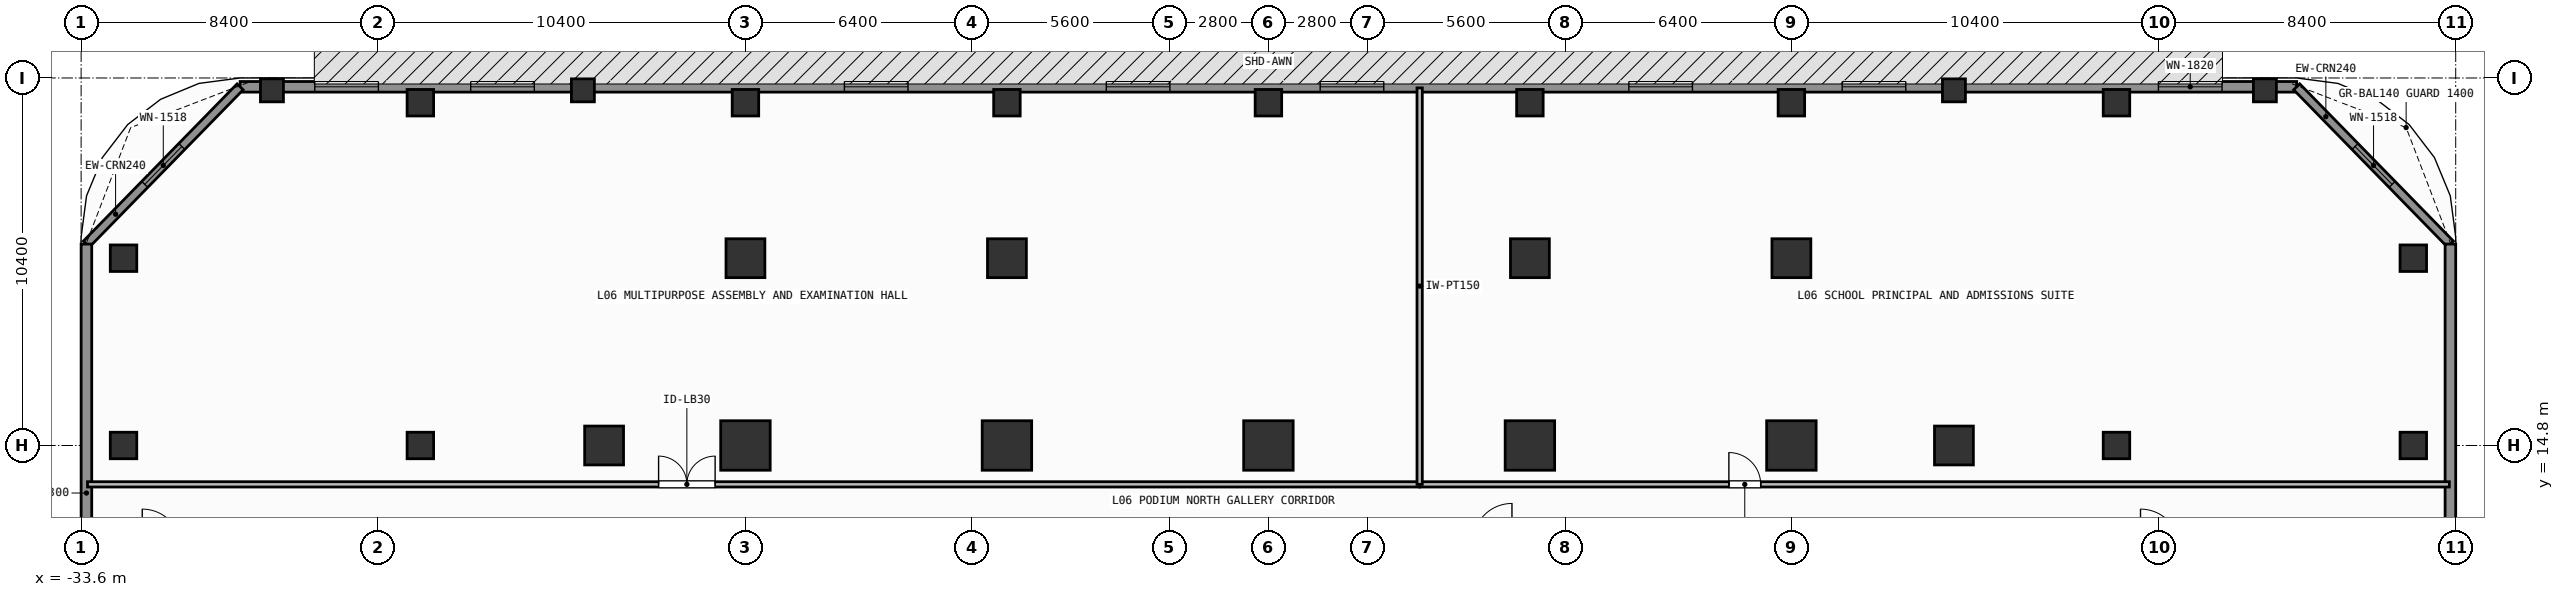
"""IFC4 building model, lengths in metres.
Left out: names, types, materials, properties, quantities, classifications, styles, units other than length and angle.
Written with IfcOpenShell. Run it as: python <this file> out.ifc"""

import sys

from ifc_helpers import new_model, si_unit, direction, frame, frame_2d, origin, origin_2d, place, context, subcontext, project, spatial, rectangle, extrude, element, fill, save


model = new_model("IFC4")
c1 = context("Model", 3, precision=1e-05, world=origin(), true_north=direction((0.0, 1.0)))
c2 = subcontext(c1, "Body", "Model", "MODEL_VIEW")
j1 = project(units=[si_unit("LENGTHUNIT", "METRE"), si_unit("PLANEANGLEUNIT", "RADIAN")], contexts=[c1])
p1 = place(None, origin())
s1 = spatial("IfcSite", under=j1, at=p1, CompositionType="ELEMENT")
p2 = place(p1, origin())
s2 = spatial("IfcBuilding", under=s1, at=p2, CompositionType="ELEMENT")
p3 = place(p2, frame((0.0, 0.0, 21.6)))
s3 = spatial("IfcBuildingStorey", under=s2, at=p3, CompositionType="ELEMENT", Elevation=21.6)
for number, where, z_axis, x_axis in (
    (1, (-14.8, 14.8, 0.0), (0.0, 0.0, 1.0), (1.0, 0.0, 0.0)),
    (2, (-7.4, 14.8, 0.0), (0.0, 0.0, 1.0), (1.0, 0.0, 0.0)),
    (3, (0.0, 14.8, 0.0), (0.0, 0.0, 1.0), (1.0, 0.0, 0.0)),
    (4, (7.4, 14.8, 0.0), (0.0, 0.0, 1.0), (1.0, 0.0, 0.0)),
    (5, (14.8, 14.8, 0.0), (0.0, 0.0, 1.0), (1.0, 0.0, 0.0)),
):
    element("IfcColumn", number, at=place(p3, frame(where, z_axis=z_axis, x_axis=x_axis)), inside=s3, PredefinedType="COLUMN", context=c2, shape_type="SweptSolid", body=[
        extrude(rectangle(XDim=1.4, YDim=1.4, at=origin_2d()), origin(), (0.0, 0.0, 1.0), 4.8),
    ])
for number, where, z_axis, x_axis in (
    (6, (-18.8, 14.8, 0.0), (0.0, 0.0, 1.0), (1.0, 0.0, 0.0)),
    (7, (19.4, 14.8, 0.0), (0.0, 0.0, 1.0), (1.0, 0.0, 0.0)),
    (8, (-14.8, 20.1, 0.0), (0.0, 0.0, 1.0), (1.0, 0.0, 0.0)),
    (9, (-7.4, 20.1, 0.0), (0.0, 0.0, 1.0), (1.0, 0.0, 0.0)),
    (10, (7.4, 20.1, 0.0), (0.0, 0.0, 1.0), (1.0, 0.0, 0.0)),
    (11, (14.8, 20.1, 0.0), (0.0, 0.0, 1.0), (1.0, 0.0, 0.0)),
):
    element("IfcColumn", number, at=place(p3, frame(where, z_axis=z_axis, x_axis=x_axis)), inside=s3, PredefinedType="COLUMN", context=c2, shape_type="SweptSolid", body=[
        extrude(rectangle(XDim=1.1, YDim=1.1, at=origin_2d()), origin(), (0.0, 0.0, 1.0), 4.8),
    ])
for number, where, z_axis, x_axis in (
    (12, (-32.4, 14.8, 0.0), (0.0, 0.0, 1.0), (1.0, 0.0, 0.0)),
    (13, (-24.0, 14.8, 0.0), (0.0, 0.0, 1.0), (1.0, 0.0, 0.0)),
    (14, (-24.0, 24.5, 0.0), (0.0, 0.0, 1.0), (1.0, 0.0, 0.0)),
    (15, (-14.8, 24.5, 0.0), (0.0, 0.0, 1.0), (1.0, 0.0, 0.0)),
    (16, (-7.4, 24.5, 0.0), (0.0, 0.0, 1.0), (1.0, 0.0, 0.0)),
    (17, (0.0, 24.5, 0.0), (0.0, 0.0, 1.0), (1.0, 0.0, 0.0)),
    (18, (7.4, 24.5, 0.0), (0.0, 0.0, 1.0), (1.0, 0.0, 0.0)),
    (19, (14.8, 24.5, 0.0), (0.0, 0.0, 1.0), (1.0, 0.0, 0.0)),
    (20, (24.0, 14.8, 0.0), (0.0, 0.0, 1.0), (1.0, 0.0, 0.0)),
    (21, (24.0, 24.5, 0.0), (0.0, 0.0, 1.0), (1.0, 0.0, 0.0)),
    (22, (32.4, 14.8, 0.0), (0.0, 0.0, 1.0), (1.0, 0.0, 0.0)),
    (23, (-32.4, 20.1, 0.0), (0.0, 0.0, 1.0), (1.0, 0.0, 0.0)),
    (24, (32.4, 20.1, 0.0), (0.0, 0.0, 1.0), (1.0, 0.0, 0.0)),
):
    element("IfcColumn", number, at=place(p3, frame(where, z_axis=z_axis, x_axis=x_axis)), inside=s3, PredefinedType="COLUMN", context=c2, shape_type="SweptSolid", body=[
        extrude(rectangle(XDim=0.75, YDim=0.75, at=origin_2d()), origin(), (0.0, 0.0, 1.0), 4.8),
    ])
for number, where, z_axis, x_axis in (
    (25, (-28.2, 24.85, 0.0), (0.0, 0.0, 1.0), (1.0, 0.0, 0.0)),
    (26, (-19.4, 24.85, 0.0), (0.0, 0.0, 1.0), (1.0, 0.0, 0.0)),
    (27, (19.4, 24.85, 0.0), (0.0, 0.0, 1.0), (1.0, 0.0, 0.0)),
    (28, (28.2, 24.85, 0.0), (0.0, 0.0, 1.0), (1.0, 0.0, 0.0)),
):
    element("IfcColumn", number, at=place(p3, frame(where, z_axis=z_axis, x_axis=x_axis)), inside=s3, PredefinedType="PILASTER", context=c2, shape_type="SweptSolid", body=[
        extrude(rectangle(XDim=0.65, YDim=0.65, at=origin_2d()), origin(), (0.0, 0.0, 1.0), 4.8),
    ])
p4 = place(p3, frame((-29.1, 24.95, 0.0), z_axis=(0.0, 0.0, 1.0), x_axis=(1.0, 0.0, 0.0)))
e29 = element("IfcWall", 29, at=p4, inside=s3, PredefinedType="SOLIDWALL", context=c2, shape_type="SweptSolid", body=[
    extrude(rectangle(XDim=58.2, YDim=0.3, at=frame_2d((29.1, 0.0))), origin(), (0.0, 0.0, 1.0), 4.48),
])
p5 = place(p4, frame((2.113, 0.0, 0.85)))
e30 = element("IfcOpeningElement", 30, at=p5, cuts=e29, PredefinedType="OPENING", context=c2, shape_type="SweptSolid", body=[
    extrude(rectangle(XDim=1.8, YDim=2.0, at=frame_2d((0.9, 1.0))), frame((0.0, 0.16, 0.0), z_axis=(0.0, -1.0, 0.0), x_axis=(1.0, 0.0, 0.0)), (0.0, 0.0, 1.0), 0.32),
])
p6 = place(p4, frame((6.525, 0.0, 0.85)))
e31 = element("IfcOpeningElement", 31, at=p6, cuts=e29, PredefinedType="OPENING", context=c2, shape_type="SweptSolid", body=[
    extrude(rectangle(XDim=1.8, YDim=2.0, at=frame_2d((0.9, 1.0))), frame((0.0, 0.16, 0.0), z_axis=(0.0, -1.0, 0.0), x_axis=(1.0, 0.0, 0.0)), (0.0, 0.0, 1.0), 0.32),
])
p7 = place(p4, frame((17.1, 0.0, 0.85)))
e32 = element("IfcOpeningElement", 32, at=p7, cuts=e29, PredefinedType="OPENING", context=c2, shape_type="SweptSolid", body=[
    extrude(rectangle(XDim=1.8, YDim=2.0, at=frame_2d((0.9, 1.0))), frame((0.0, 0.16, 0.0), z_axis=(0.0, -1.0, 0.0), x_axis=(1.0, 0.0, 0.0)), (0.0, 0.0, 1.0), 0.32),
])
p8 = place(p4, frame((24.512, 0.0, 0.85)))
e33 = element("IfcOpeningElement", 33, at=p8, cuts=e29, PredefinedType="OPENING", context=c2, shape_type="SweptSolid", body=[
    extrude(rectangle(XDim=1.8, YDim=2.0, at=frame_2d((0.9, 1.0))), frame((0.0, 0.16, 0.0), z_axis=(0.0, -1.0, 0.0), x_axis=(1.0, 0.0, 0.0)), (0.0, 0.0, 1.0), 0.32),
])
p9 = place(p4, frame((30.565, 0.0, 0.85)))
e34 = element("IfcOpeningElement", 34, at=p9, cuts=e29, PredefinedType="OPENING", context=c2, shape_type="SweptSolid", body=[
    extrude(rectangle(XDim=1.8, YDim=2.0, at=frame_2d((0.9, 1.0))), frame((0.0, 0.16, 0.0), z_axis=(0.0, -1.0, 0.0), x_axis=(1.0, 0.0, 0.0)), (0.0, 0.0, 1.0), 0.32),
])
p10 = place(p4, frame((39.3, 0.0, 0.85)))
e35 = element("IfcOpeningElement", 35, at=p10, cuts=e29, PredefinedType="OPENING", context=c2, shape_type="SweptSolid", body=[
    extrude(rectangle(XDim=1.8, YDim=2.0, at=frame_2d((0.9, 1.0))), frame((0.0, 0.16, 0.0), z_axis=(0.0, -1.0, 0.0), x_axis=(1.0, 0.0, 0.0)), (0.0, 0.0, 1.0), 0.32),
])
p11 = place(p4, frame((45.337, 0.0, 0.85)))
e36 = element("IfcOpeningElement", 36, at=p11, cuts=e29, PredefinedType="OPENING", context=c2, shape_type="SweptSolid", body=[
    extrude(rectangle(XDim=1.8, YDim=2.0, at=frame_2d((0.9, 1.0))), frame((0.0, 0.16, 0.0), z_axis=(0.0, -1.0, 0.0), x_axis=(1.0, 0.0, 0.0)), (0.0, 0.0, 1.0), 0.32),
])
p12 = place(p4, frame((54.287, 0.0, 0.85)))
e37 = element("IfcOpeningElement", 37, at=p12, cuts=e29, PredefinedType="OPENING", context=c2, shape_type="SweptSolid", body=[
    extrude(rectangle(XDim=1.8, YDim=2.0, at=frame_2d((0.9, 1.0))), frame((0.0, 0.16, 0.0), z_axis=(0.0, -1.0, 0.0), x_axis=(1.0, 0.0, 0.0)), (0.0, 0.0, 1.0), 0.32),
])
p13 = place(p3, frame((-33.45, 20.5, 0.0), z_axis=(0.0, 0.0, 1.0), x_axis=(0.69901822973, 0.715103848756, 0.0)))
e38 = element("IfcWall", 38, at=p13, inside=s3, PredefinedType="SOLIDWALL", context=c2, shape_type="SweptSolid", body=[
    extrude(rectangle(XDim=6.223, YDim=0.24, at=frame_2d((3.111, 0.0))), origin(), (0.0, 0.0, 1.0), 4.48),
])
p14 = place(p13, frame((2.362, 0.0, 0.85)))
e39 = element("IfcOpeningElement", 39, at=p14, cuts=e38, PredefinedType="OPENING", context=c2, shape_type="SweptSolid", body=[
    extrude(rectangle(XDim=1.5, YDim=1.85, at=frame_2d((0.75, 0.925))), frame((0.0, 0.13, 0.0), z_axis=(0.0, -1.0, 0.0), x_axis=(1.0, 0.0, 0.0)), (0.0, 0.0, 1.0), 0.26),
])
p15 = place(p3, frame((29.1, 24.95, 0.0), z_axis=(0.0, 0.0, 1.0), x_axis=(0.69901822973, -0.715103848756, 0.0)))
e40 = element("IfcWall", 40, at=p15, inside=s3, PredefinedType="SOLIDWALL", context=c2, shape_type="SweptSolid", body=[
    extrude(rectangle(XDim=6.223, YDim=0.24, at=frame_2d((3.111, 0.0))), origin(), (0.0, 0.0, 1.0), 4.48),
])
p16 = place(p15, frame((2.362, 0.0, 0.85)))
e41 = element("IfcOpeningElement", 41, at=p16, cuts=e40, PredefinedType="OPENING", context=c2, shape_type="SweptSolid", body=[
    extrude(rectangle(XDim=1.5, YDim=1.85, at=frame_2d((0.75, 0.925))), frame((0.0, 0.13, 0.0), z_axis=(0.0, -1.0, 0.0), x_axis=(1.0, 0.0, 0.0)), (0.0, 0.0, 1.0), 0.26),
])
for number, where, z_axis, x_axis in (
    (42, (-33.45, 6.41, 0.0), (0.0, 0.0, 1.0), (0.0, 1.0, 0.0)),
    (43, (33.45, 6.41, 0.0), (0.0, 0.0, 1.0), (0.0, 1.0, 0.0)),
):
    element("IfcWall", number, at=place(p3, frame(where, z_axis=z_axis, x_axis=x_axis)), inside=s3, PredefinedType="SOLIDWALL", context=c2, shape_type="SweptSolid", body=[
        extrude(rectangle(XDim=14.09, YDim=0.3, at=frame_2d((7.045, 0.0))), origin(), (0.0, 0.0, 1.0), 4.48),
    ])
p17 = place(p3, frame((-33.42, 13.7, 0.0), z_axis=(0.0, 0.0, 1.0), x_axis=(1.0, 0.0, 0.0)))
e44 = element("IfcWall", 44, at=p17, inside=s3, PredefinedType="PARTITIONING", context=c2, shape_type="SweptSolid", body=[
    extrude(rectangle(XDim=37.7, YDim=0.15, at=frame_2d((18.85, 0.0))), origin(), (0.0, 0.0, 1.0), 4.48),
])
p18 = place(p17, frame((16.162, 0.0, 0.0)))
e45 = element("IfcOpeningElement", 45, at=p18, cuts=e44, PredefinedType="OPENING", context=c2, shape_type="SweptSolid", body=[
    extrude(rectangle(XDim=1.6, YDim=2.3, at=frame_2d((0.8, 1.15))), frame((0.0, 0.085, 0.0), z_axis=(0.0, -1.0, 0.0), x_axis=(1.0, 0.0, 0.0)), (0.0, 0.0, 1.0), 0.17),
])
p19 = place(p3, frame((4.28, 13.7, 0.0), z_axis=(0.0, 0.0, 1.0), x_axis=(1.0, 0.0, 0.0)))
e46 = element("IfcWall", 46, at=p19, inside=s3, PredefinedType="PARTITIONING", context=c2, shape_type="SweptSolid", body=[
    extrude(rectangle(XDim=29.14, YDim=0.15, at=frame_2d((14.57, 0.0))), origin(), (0.0, 0.0, 1.0), 4.48),
])
p20 = place(p19, frame((8.751, 0.0, 0.0)))
e47 = element("IfcOpeningElement", 47, at=p20, cuts=e46, PredefinedType="OPENING", context=c2, shape_type="SweptSolid", body=[
    extrude(rectangle(XDim=0.9, YDim=2.1, at=frame_2d((0.45, 1.05))), frame((0.0, 0.085, 0.0), z_axis=(0.0, -1.0, 0.0), x_axis=(1.0, 0.0, 0.0)), (0.0, 0.0, 1.0), 0.17),
])
p21 = place(p3, frame((4.28, 13.7, 0.0), z_axis=(0.0, 0.0, 1.0), x_axis=(0.0, 1.0, 0.0)))
e48 = element("IfcWall", 48, at=p21, inside=s3, PredefinedType="PARTITIONING", context=c2, shape_type="SweptSolid", body=[
    extrude(rectangle(XDim=11.22, YDim=0.15, at=frame_2d((5.61, 0.0))), origin(), (0.0, 0.0, 1.0), 4.48),
])
p22 = place(p14, origin())
e49 = element("IfcWindow", 49, at=p22, inside=s3, PartitioningType="SINGLE_PANEL", PredefinedType="WINDOW", context=c2, shape_type="SweptSolid", body=[
    extrude(rectangle(XDim=1.5, YDim=1.85, at=frame_2d((0.75, 0.925))), frame((0.0, 0.03, 0.0), z_axis=(0.0, -1.0, 0.0), x_axis=(1.0, 0.0, 0.0)), (0.0, 0.0, 1.0), 0.06),
])
fill(e39, e49)
p23 = place(p16, origin())
e50 = element("IfcWindow", 50, at=p23, inside=s3, PartitioningType="SINGLE_PANEL", PredefinedType="WINDOW", context=c2, shape_type="SweptSolid", body=[
    extrude(rectangle(XDim=1.5, YDim=1.85, at=frame_2d((0.75, 0.925))), frame((0.0, 0.03, 0.0), z_axis=(0.0, -1.0, 0.0), x_axis=(1.0, 0.0, 0.0)), (0.0, 0.0, 1.0), 0.06),
])
fill(e41, e50)
p24 = place(p5, origin())
e51 = element("IfcWindow", 51, at=p24, inside=s3, PartitioningType="SINGLE_PANEL", PredefinedType="WINDOW", context=c2, shape_type="SweptSolid", body=[
    extrude(rectangle(XDim=1.8, YDim=2.0, at=frame_2d((0.9, 1.0))), frame((0.0, 0.03, 0.0), z_axis=(0.0, -1.0, 0.0), x_axis=(1.0, 0.0, 0.0)), (0.0, 0.0, 1.0), 0.06),
])
fill(e30, e51)
p25 = place(p6, origin())
e52 = element("IfcWindow", 52, at=p25, inside=s3, PartitioningType="SINGLE_PANEL", PredefinedType="WINDOW", context=c2, shape_type="SweptSolid", body=[
    extrude(rectangle(XDim=1.8, YDim=2.0, at=frame_2d((0.9, 1.0))), frame((0.0, 0.03, 0.0), z_axis=(0.0, -1.0, 0.0), x_axis=(1.0, 0.0, 0.0)), (0.0, 0.0, 1.0), 0.06),
])
fill(e31, e52)
p26 = place(p7, origin())
e53 = element("IfcWindow", 53, at=p26, inside=s3, PartitioningType="SINGLE_PANEL", PredefinedType="WINDOW", context=c2, shape_type="SweptSolid", body=[
    extrude(rectangle(XDim=1.8, YDim=2.0, at=frame_2d((0.9, 1.0))), frame((0.0, 0.03, 0.0), z_axis=(0.0, -1.0, 0.0), x_axis=(1.0, 0.0, 0.0)), (0.0, 0.0, 1.0), 0.06),
])
fill(e32, e53)
p27 = place(p8, origin())
e54 = element("IfcWindow", 54, at=p27, inside=s3, PartitioningType="SINGLE_PANEL", PredefinedType="WINDOW", context=c2, shape_type="SweptSolid", body=[
    extrude(rectangle(XDim=1.8, YDim=2.0, at=frame_2d((0.9, 1.0))), frame((0.0, 0.03, 0.0), z_axis=(0.0, -1.0, 0.0), x_axis=(1.0, 0.0, 0.0)), (0.0, 0.0, 1.0), 0.06),
])
fill(e33, e54)
p28 = place(p9, origin())
e55 = element("IfcWindow", 55, at=p28, inside=s3, PartitioningType="SINGLE_PANEL", PredefinedType="WINDOW", context=c2, shape_type="SweptSolid", body=[
    extrude(rectangle(XDim=1.8, YDim=2.0, at=frame_2d((0.9, 1.0))), frame((0.0, 0.03, 0.0), z_axis=(0.0, -1.0, 0.0), x_axis=(1.0, 0.0, 0.0)), (0.0, 0.0, 1.0), 0.06),
])
fill(e34, e55)
p29 = place(p10, origin())
e56 = element("IfcWindow", 56, at=p29, inside=s3, PartitioningType="SINGLE_PANEL", PredefinedType="WINDOW", context=c2, shape_type="SweptSolid", body=[
    extrude(rectangle(XDim=1.8, YDim=2.0, at=frame_2d((0.9, 1.0))), frame((0.0, 0.03, 0.0), z_axis=(0.0, -1.0, 0.0), x_axis=(1.0, 0.0, 0.0)), (0.0, 0.0, 1.0), 0.06),
])
fill(e35, e56)
p30 = place(p11, origin())
e57 = element("IfcWindow", 57, at=p30, inside=s3, PartitioningType="SINGLE_PANEL", PredefinedType="WINDOW", context=c2, shape_type="SweptSolid", body=[
    extrude(rectangle(XDim=1.8, YDim=2.0, at=frame_2d((0.9, 1.0))), frame((0.0, 0.03, 0.0), z_axis=(0.0, -1.0, 0.0), x_axis=(1.0, 0.0, 0.0)), (0.0, 0.0, 1.0), 0.06),
])
fill(e36, e57)
p31 = place(p12, origin())
e58 = element("IfcWindow", 58, at=p31, inside=s3, PartitioningType="SINGLE_PANEL", PredefinedType="WINDOW", context=c2, shape_type="SweptSolid", body=[
    extrude(rectangle(XDim=1.8, YDim=2.0, at=frame_2d((0.9, 1.0))), frame((0.0, 0.03, 0.0), z_axis=(0.0, -1.0, 0.0), x_axis=(1.0, 0.0, 0.0)), (0.0, 0.0, 1.0), 0.06),
])
fill(e37, e58)
p32 = place(p18, origin())
e59 = element("IfcDoor", 59, at=p32, inside=s3, OperationType="SINGLE_SWING_LEFT", PredefinedType="DOOR", context=c2, shape_type="SweptSolid", body=[
    extrude(rectangle(XDim=1.6, YDim=2.3, at=frame_2d((0.8, 1.15))), frame((0.0, 0.025, 0.0), z_axis=(0.0, -1.0, 0.0), x_axis=(1.0, 0.0, 0.0)), (0.0, 0.0, 1.0), 0.05),
])
fill(e45, e59)
p33 = place(p20, origin())
e60 = element("IfcDoor", 60, at=p33, inside=s3, OperationType="SINGLE_SWING_LEFT", PredefinedType="DOOR", context=c2, shape_type="SweptSolid", body=[
    extrude(rectangle(XDim=0.9, YDim=2.1, at=frame_2d((0.45, 1.05))), frame((0.0, 0.025, 0.0), z_axis=(0.0, -1.0, 0.0), x_axis=(1.0, 0.0, 0.0)), (0.0, 0.0, 1.0), 0.05),
])
fill(e47, e60)
save(model, sys.argv[1])
